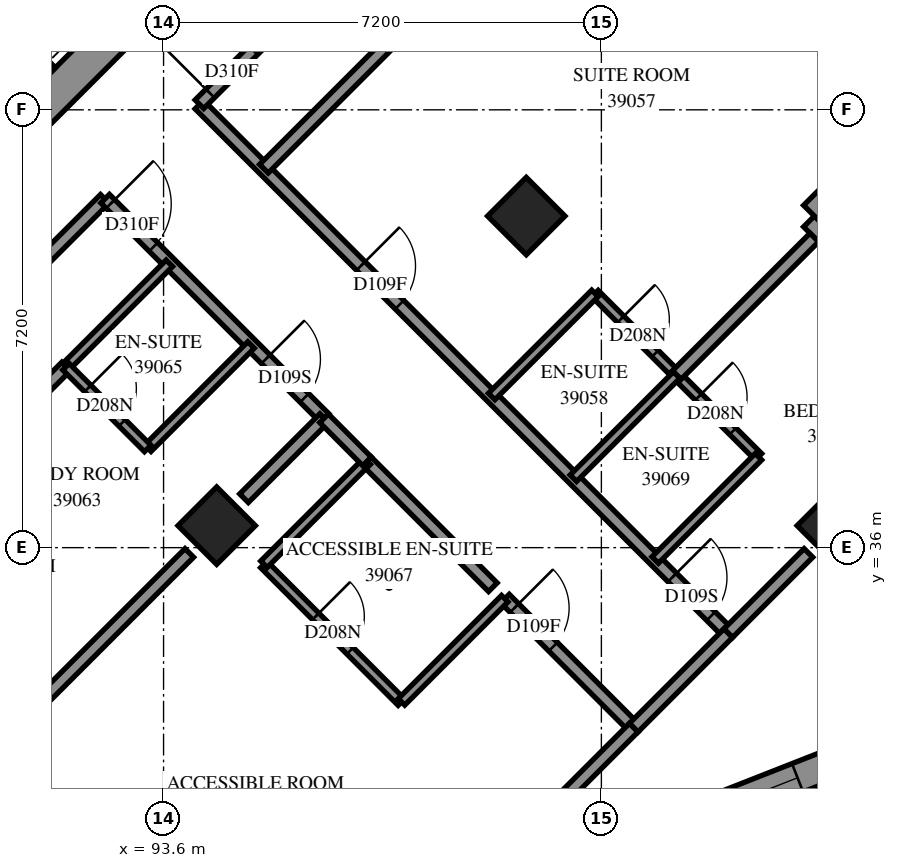
"""IFC4 building model, lengths in metres.
Left out: names, types, materials, properties, quantities, classifications, styles, units other than length and angle.
Written with IfcOpenShell. Run it as: python <this file> out.ifc"""

import sys

from ifc_helpers import new_model, si_unit, direction, frame, frame_2d, origin, origin_2d, place, context, subcontext, project, spatial, polyline, rectangle, outline, extrude, element, fill, save


model = new_model("IFC4")
c1 = context("Model", 3, precision=1e-05, world=origin(), true_north=direction((0.0, 1.0)))
c2 = subcontext(c1, "Body", "Model", "MODEL_VIEW")
j1 = project(units=[si_unit("LENGTHUNIT", "METRE"), si_unit("PLANEANGLEUNIT", "RADIAN")], contexts=[c1])
p1 = place(None, origin())
s1 = spatial("IfcSite", under=j1, at=p1, CompositionType="ELEMENT")
p2 = place(p1, origin())
s2 = spatial("IfcBuilding", under=s1, at=p2, CompositionType="ELEMENT")
p3 = place(p2, frame((0.0, 0.0, 145.6)))
s3 = spatial("IfcBuildingStorey", under=s2, at=p3, CompositionType="ELEMENT", Elevation=145.6)
for number, where, z_axis, x_axis in (
    (1, (99.565, 41.453, 0.0), (0.0, 0.0, 1.0), (0.707, -0.707, 0.0)),
    (2, (94.474, 36.362, 0.0), (0.0, 0.0, 1.0), (0.707, -0.707, 0.0)),
    (3, (104.656, 36.362, 0.0), (0.0, 0.0, 1.0), (0.707, -0.707, 0.0)),
):
    element("IfcColumn", number, at=place(p3, frame(where, z_axis=z_axis, x_axis=x_axis)), inside=s3, PredefinedType="COLUMN", context=c2, shape_type="SweptSolid", body=[
        extrude(rectangle(XDim=0.9, YDim=0.9, at=origin_2d()), origin(), (0.0, 0.0, 1.0), 3.1),
    ])
p4 = place(p3, frame((87.049, 38.695, -0.3), z_axis=(0.0, 0.0, 1.0), x_axis=(0.7071067812, 0.7071067812, 0.0)))
e4 = element("IfcWall", 4, at=p4, inside=s3, PredefinedType="SHEAR", context=c2, shape_type="SweptSolid", body=[
    extrude(rectangle(XDim=14.4, YDim=0.6, at=frame_2d((7.2, 0.0))), origin(), (0.0, 0.0, 1.0), 2.7),
])
p5 = place(p4, frame((4.55, 0.0, 0.3)))
e5 = element("IfcOpeningElement", 5, at=p5, cuts=e4, PredefinedType="OPENING", context=c2, shape_type="SweptSolid", body=[
    extrude(rectangle(XDim=1.1, YDim=2.1, at=frame_2d((0.55, 1.05))), frame((0.0, 0.31, 0.0), z_axis=(0.0, -1.0, 0.0), x_axis=(1.0, 0.0, 0.0)), (0.0, 0.0, 1.0), 0.62),
])
p6 = place(p4, frame((11.35, 0.0, 0.3)))
e6 = element("IfcOpeningElement", 6, at=p6, cuts=e4, PredefinedType="OPENING", context=c2, shape_type="SweptSolid", body=[
    extrude(rectangle(XDim=1.1, YDim=2.1, at=frame_2d((0.55, 1.05))), frame((0.0, 0.31, 0.0), z_axis=(0.0, -1.0, 0.0), x_axis=(1.0, 0.0, 0.0)), (0.0, 0.0, 1.0), 0.62),
])
p7 = place(p3, frame((81.534, 53.969, 0.0), z_axis=(0.0, 0.0, 1.0), x_axis=(0.707103309, -0.7071102534, 0.0)))
e7 = element("IfcWall", 7, at=p7, inside=s3, PredefinedType="SOLIDWALL", context=c2, shape_type="SweptSolid", body=[
    extrude(rectangle(XDim=14.4, YDim=0.3, at=frame_2d((7.2, 0.0))), origin(), (0.0, 0.0, 1.0), 3.1),
])
p8 = place(p7, frame((1.25, 0.0, 0.0)))
e8 = element("IfcOpeningElement", 8, at=p8, cuts=e7, PredefinedType="OPENING", context=c2, shape_type="SweptSolid", body=[
    extrude(rectangle(XDim=1.1, YDim=2.1, at=frame_2d((0.55, 1.05))), frame((0.0, 0.16, 0.0), z_axis=(0.0, -1.0, 0.0), x_axis=(1.0, 0.0, 0.0)), (0.0, 0.0, 1.0), 0.32),
])
p9 = place(p7, frame((4.85, 0.0, 0.0)))
e9 = element("IfcOpeningElement", 9, at=p9, cuts=e7, PredefinedType="OPENING", context=c2, shape_type="SweptSolid", body=[
    extrude(rectangle(XDim=1.1, YDim=2.1, at=frame_2d((0.55, 1.05))), frame((0.0, 0.16, 0.0), z_axis=(0.0, -1.0, 0.0), x_axis=(1.0, 0.0, 0.0)), (0.0, 0.0, 1.0), 0.32),
])
p10 = place(p7, frame((8.45, 0.0, 0.0)))
e10 = element("IfcOpeningElement", 10, at=p10, cuts=e7, PredefinedType="OPENING", context=c2, shape_type="SweptSolid", body=[
    extrude(rectangle(XDim=1.1, YDim=2.1, at=frame_2d((0.55, 1.05))), frame((0.0, 0.16, 0.0), z_axis=(0.0, -1.0, 0.0), x_axis=(1.0, 0.0, 0.0)), (0.0, 0.0, 1.0), 0.32),
])
p11 = place(p7, frame((12.05, 0.0, 0.0)))
e11 = element("IfcOpeningElement", 11, at=p11, cuts=e7, PredefinedType="OPENING", context=c2, shape_type="SweptSolid", body=[
    extrude(rectangle(XDim=1.1, YDim=2.1, at=frame_2d((0.55, 1.05))), frame((0.0, 0.16, 0.0), z_axis=(0.0, -1.0, 0.0), x_axis=(1.0, 0.0, 0.0)), (0.0, 0.0, 1.0), 0.32),
])
p12 = place(p3, frame((100.86, 30.972, 0.0), z_axis=(0.0, 0.0, 1.0), x_axis=(0.9307296188, 0.3657080484, 0.0)))
e12 = element("IfcWall", 12, at=p12, inside=s3, PredefinedType="SOLIDWALL", context=c2, shape_type="SweptSolid", body=[
    extrude(outline(polyline([(0.109, -0.25), (5.615, -0.25), (5.388, 0.25), (-0.109, 0.25), (0.109, -0.25)])), origin(), (0.0, 0.0, 1.0), 3.1),
])
p13 = place(p12, frame((0.602, 0.0, 0.45)))
e13 = element("IfcOpeningElement", 13, at=p13, cuts=e12, PredefinedType="OPENING", context=c2, shape_type="SweptSolid", body=[
    extrude(rectangle(XDim=2.8, YDim=2.5, at=frame_2d((1.4, 1.25))), frame((0.0, 0.26, 0.0), z_axis=(0.0, -1.0, 0.0), x_axis=(1.0, 0.0, 0.0)), (0.0, 0.0, 1.0), 0.52),
])
p14 = place(p3, frame((107.761, 37.994, 0.0), z_axis=(0.0, 0.0, 1.0), x_axis=(-0.7071170016, 0.7070965606, 0.0)))
e14 = element("IfcWall", 14, at=p14, inside=s3, PredefinedType="SOLIDWALL", context=c2, shape_type="SweptSolid", body=[
    extrude(outline(polyline([(-0.158, -0.25), (4.642, -0.25), (5.142, 0.25), (0.158, 0.25), (-0.158, -0.25)])), origin(), (0.0, 0.0, 1.0), 3.1),
])
p15 = place(p14, frame((1.967, 0.0, 0.6)))
e15 = element("IfcOpeningElement", 15, at=p15, cuts=e14, PredefinedType="OPENING", context=c2, shape_type="SweptSolid", body=[
    extrude(rectangle(XDim=1.8, YDim=1.9, at=frame_2d((0.9, 0.95))), frame((0.0, 0.26, 0.0), z_axis=(0.0, -1.0, 0.0), x_axis=(1.0, 0.0, 0.0)), (0.0, 0.0, 1.0), 0.52),
])
p16 = place(p3, frame((104.302, 41.453, 0.0), z_axis=(0.0, 0.0, 1.0), x_axis=(0.7071155421, 0.7070980202, 0.0)))
e16 = element("IfcWall", 16, at=p16, inside=s3, PredefinedType="SOLIDWALL", context=c2, shape_type="SweptSolid", body=[
    extrude(outline(polyline([(0.25, -0.25), (6.041, -0.25), (5.373, 0.25), (-0.25, 0.25), (0.25, -0.25)])), origin(), (0.0, 0.0, 1.0), 3.1),
])
p17 = place(p16, frame((1.125, 0.0, 0.6)))
e17 = element("IfcOpeningElement", 17, at=p17, cuts=e16, PredefinedType="OPENING", context=c2, shape_type="SweptSolid", body=[
    extrude(rectangle(XDim=1.8, YDim=1.9, at=frame_2d((0.9, 0.95))), frame((0.0, 0.26, 0.0), z_axis=(0.0, -1.0, 0.0), x_axis=(1.0, 0.0, 0.0)), (0.0, 0.0, 1.0), 0.52),
])
p18 = place(p3, frame((94.189, 43.287, 0.0), z_axis=(0.0, 0.0, 1.0), x_axis=(0.7071067812, -0.7071067812, 0.0)))
e18 = element("IfcWall", 18, at=p18, inside=s3, PredefinedType="PARTITIONING", context=c2, shape_type="SweptSolid", body=[
    extrude(rectangle(XDim=12.298, YDim=0.2, at=frame_2d((6.149, 0.0))), origin(), (0.0, 0.0, 1.0), 3.1),
])
p19 = place(p18, frame((3.755, 0.0, 0.0)))
e19 = element("IfcOpeningElement", 19, at=p19, cuts=e18, PredefinedType="OPENING", context=c2, shape_type="SweptSolid", body=[
    extrude(rectangle(XDim=0.9, YDim=2.1, at=frame_2d((0.45, 1.05))), frame((0.0, 0.11, 0.0), z_axis=(0.0, -1.0, 0.0), x_axis=(1.0, 0.0, 0.0)), (0.0, 0.0, 1.0), 0.22),
])
p20 = place(p18, frame((10.998, 0.0, 0.0)))
e20 = element("IfcOpeningElement", 20, at=p20, cuts=e18, PredefinedType="OPENING", context=c2, shape_type="SweptSolid", body=[
    extrude(rectangle(XDim=0.9, YDim=2.1, at=frame_2d((0.45, 1.05))), frame((0.0, 0.11, 0.0), z_axis=(0.0, -1.0, 0.0), x_axis=(1.0, 0.0, 0.0)), (0.0, 0.0, 1.0), 0.22),
])
p21 = place(p3, frame((95.25, 42.232, 0.0), z_axis=(0.0, 0.0, 1.0), x_axis=(0.7071114386, 0.7071021238, 0.0)))
e21 = element("IfcWall", 21, at=p21, inside=s3, PredefinedType="PARTITIONING", context=c2, shape_type="SweptSolid", body=[
    extrude(rectangle(XDim=10.736, YDim=0.2, at=frame_2d((5.368, 0.0))), origin(), (0.0, 0.0, 1.0), 3.1),
])
p22 = place(p3, frame((94.19, 43.292, 0.0), z_axis=(0.0, 0.0, 1.0), x_axis=(0.7071067812, 0.7071067812, 0.0)))
e22 = element("IfcWall", 22, at=p22, inside=s3, PredefinedType="PARTITIONING", context=c2, shape_type="SweptSolid", body=[
    extrude(rectangle(XDim=8.2, YDim=0.2, at=frame_2d((4.1, 0.0))), origin(), (0.0, 0.0, 1.0), 3.1),
])
p23 = place(p22, frame((0.251, 0.0, 0.0)))
e23 = element("IfcOpeningElement", 23, at=p23, cuts=e22, PredefinedType="OPENING", context=c2, shape_type="SweptSolid", body=[
    extrude(rectangle(XDim=1.0, YDim=2.1, at=frame_2d((0.5, 1.05))), frame((0.0, 0.11, 0.0), z_axis=(0.0, -1.0, 0.0), x_axis=(1.0, 0.0, 0.0)), (0.0, 0.0, 1.0), 0.22),
])
p24 = place(p3, frame((86.836, 35.938, 0.0), z_axis=(0.0, 0.0, 1.0), x_axis=(0.7071067812, 0.7071067812, 0.0)))
e24 = element("IfcWall", 24, at=p24, inside=s3, PredefinedType="PARTITIONING", context=c2, shape_type="SweptSolid", body=[
    extrude(rectangle(XDim=8.2, YDim=0.2, at=frame_2d((4.1, 0.0))), origin(), (0.0, 0.0, 1.0), 3.1),
])
p25 = place(p3, frame((86.33, 33.311, 0.0), z_axis=(0.0, 0.0, 1.0), x_axis=(0.7071005425, 0.7071130198, 0.0)))
e25 = element("IfcWall", 25, at=p25, inside=s3, PredefinedType="PARTITIONING", context=c2, shape_type="SweptSolid", body=[
    extrude(rectangle(XDim=8.015, YDim=0.2, at=frame_2d((4.007, 0.0))), origin(), (0.0, 0.0, 1.0), 3.1),
])
p26 = place(p3, frame((89.831, 31.721, 0.0), z_axis=(0.0, 0.0, 1.0), x_axis=(0.7071067812, 0.7071067812, 0.0)))
e26 = element("IfcWall", 26, at=p26, inside=s3, PredefinedType="PARTITIONING", context=c2, shape_type="SweptSolid", body=[
    extrude(rectangle(XDim=5.928, YDim=0.2, at=frame_2d((2.964, 0.0))), origin(), (0.0, 0.0, 1.0), 3.1),
])
p27 = place(p3, frame((92.639, 41.739, 0.0), z_axis=(0.0, 0.0, 1.0), x_axis=(0.7071067812, -0.7071067812, 0.0)))
e27 = element("IfcWall", 27, at=p27, inside=s3, PredefinedType="PARTITIONING", context=c2, shape_type="SweptSolid", body=[
    extrude(rectangle(XDim=5.1, YDim=0.2, at=frame_2d((2.55, 0.0))), origin(), (0.0, 0.0, 1.0), 3.1),
])
p28 = place(p27, frame((0.123, 0.0, 0.0)))
e28 = element("IfcOpeningElement", 28, at=p28, cuts=e27, PredefinedType="OPENING", context=c2, shape_type="SweptSolid", body=[
    extrude(rectangle(XDim=1.0, YDim=2.1, at=frame_2d((0.5, 1.05))), frame((0.0, 0.11, 0.0), z_axis=(0.0, -1.0, 0.0), x_axis=(1.0, 0.0, 0.0)), (0.0, 0.0, 1.0), 0.22),
])
p29 = place(p27, frame((3.734, 0.0, 0.0)))
e29 = element("IfcOpeningElement", 29, at=p29, cuts=e27, PredefinedType="OPENING", context=c2, shape_type="SweptSolid", body=[
    extrude(rectangle(XDim=0.9, YDim=2.1, at=frame_2d((0.45, 1.05))), frame((0.0, 0.11, 0.0), z_axis=(0.0, -1.0, 0.0), x_axis=(1.0, 0.0, 0.0)), (0.0, 0.0, 1.0), 0.22),
])
p30 = place(p3, frame((100.694, 40.178, 0.0), z_axis=(0.0, 0.0, 1.0), x_axis=(0.7076329021, -0.7065802685, 0.0)))
e30 = element("IfcWall", 30, at=p30, inside=s3, PredefinedType="PARTITIONING", context=c2, shape_type="SweptSolid", body=[
    extrude(rectangle(XDim=3.8, YDim=0.15, at=frame_2d((1.9, 0.0))), origin(), (0.0, 0.0, 1.0), 3.1),
])
p31 = place(p30, frame((0.598, 0.0, 0.0)))
e31 = element("IfcOpeningElement", 31, at=p31, cuts=e30, PredefinedType="OPENING", context=c2, shape_type="SweptSolid", body=[
    extrude(rectangle(XDim=0.8, YDim=2.1, at=frame_2d((0.4, 1.05))), frame((0.0, 0.085, 0.0), z_axis=(0.0, -1.0, 0.0), x_axis=(1.0, 0.0, 0.0)), (0.0, 0.0, 1.0), 0.17),
])
p32 = place(p30, frame((2.405, 0.0, 0.0)))
e32 = element("IfcOpeningElement", 32, at=p32, cuts=e30, PredefinedType="OPENING", context=c2, shape_type="SweptSolid", body=[
    extrude(rectangle(XDim=0.8, YDim=2.1, at=frame_2d((0.4, 1.05))), frame((0.0, 0.085, 0.0), z_axis=(0.0, -1.0, 0.0), x_axis=(1.0, 0.0, 0.0)), (0.0, 0.0, 1.0), 0.17),
])
p33 = place(p3, frame((95.249, 35.723, 0.0), z_axis=(0.0, 0.0, 1.0), x_axis=(0.7067942478, -0.7074191764, 0.0)))
e33 = element("IfcWall", 33, at=p33, inside=s3, PredefinedType="PARTITIONING", context=c2, shape_type="SweptSolid", body=[
    extrude(rectangle(XDim=3.2, YDim=0.15, at=frame_2d((1.6, 0.0))), origin(), (0.0, 0.0, 1.0), 3.1),
])
p34 = place(p33, frame((1.206, 0.0, 0.0)))
e34 = element("IfcOpeningElement", 34, at=p34, cuts=e33, PredefinedType="OPENING", context=c2, shape_type="SweptSolid", body=[
    extrude(rectangle(XDim=0.8, YDim=2.1, at=frame_2d((0.4, 1.05))), frame((0.0, 0.085, 0.0), z_axis=(0.0, -1.0, 0.0), x_axis=(1.0, 0.0, 0.0)), (0.0, 0.0, 1.0), 0.17),
])
p35 = place(p3, frame((102.04, 38.838, 0.0), z_axis=(0.0, 0.0, 1.0), x_axis=(0.7071067812, 0.7071067812, 0.0)))
e35 = element("IfcWall", 35, at=p35, inside=s3, PredefinedType="PARTITIONING", context=c2, shape_type="SweptSolid", body=[
    extrude(rectangle(XDim=3.199, YDim=0.2, at=frame_2d((1.599, 0.0))), origin(), (0.0, 0.0, 1.0), 3.1),
])
p36 = place(p3, frame((99.214, 35.162, 0.0), z_axis=(0.0, 0.0, 1.0), x_axis=(0.706773319, -0.7074400862, 0.0)))
e36 = element("IfcWall", 36, at=p36, inside=s3, PredefinedType="PARTITIONING", context=c2, shape_type="SweptSolid", body=[
    extrude(rectangle(XDim=2.999, YDim=0.2, at=frame_2d((1.5, 0.0))), origin(), (0.0, 0.0, 1.0), 3.1),
])
p37 = place(p36, frame((0.22, 0.0, 0.0)))
e37 = element("IfcOpeningElement", 37, at=p37, cuts=e36, PredefinedType="OPENING", context=c2, shape_type="SweptSolid", body=[
    extrude(rectangle(XDim=0.9, YDim=2.1, at=frame_2d((0.45, 1.05))), frame((0.0, 0.11, 0.0), z_axis=(0.0, -1.0, 0.0), x_axis=(1.0, 0.0, 0.0)), (0.0, 0.0, 1.0), 0.22),
])
p38 = place(p3, frame((96.945, 37.419, 0.0), z_axis=(0.0, 0.0, 1.0), x_axis=(0.7071067812, -0.7071067812, 0.0)))
e38 = element("IfcWall", 38, at=p38, inside=s3, PredefinedType="PARTITIONING", context=c2, shape_type="SweptSolid", body=[
    extrude(rectangle(XDim=2.927, YDim=0.2, at=frame_2d((1.464, 0.0))), origin(), (0.0, 0.0, 1.0), 3.1),
])
for number, where, z_axis, x_axis in (
    (39, (97.513, 33.463, 0.0), (0.0, 0.0, 1.0), (0.707, 0.707, 0.0)),
    (40, (93.341, 37.635, 0.0), (0.0, 0.0, 1.0), (0.707, 0.707, 0.0)),
    (41, (101.685, 35.797, 0.0), (0.0, 0.0, 1.0), (0.707, 0.707, 0.0)),
    (42, (91.997, 38.979, 0.0), (0.0, 0.0, 1.0), (0.707, 0.707, 0.0)),
):
    element("IfcWall", number, at=place(p3, frame(where, z_axis=z_axis, x_axis=x_axis)), inside=s3, PredefinedType="PARTITIONING", context=c2, shape_type="SweptSolid", body=[
        extrude(rectangle(XDim=2.401, YDim=0.15, at=frame_2d((1.201, 0.0))), origin(), (0.0, 0.0, 1.0), 3.1),
    ])
for number, where, z_axis, x_axis in (
    (43, (100.34, 37.142, 0.0), (0.0, 0.0, 1.0), (0.708, 0.707, 0.0)),
    (44, (98.996, 38.486, 0.0), (0.0, 0.0, 1.0), (0.708, 0.707, 0.0)),
):
    element("IfcWall", number, at=place(p3, frame(where, z_axis=z_axis, x_axis=x_axis)), inside=s3, PredefinedType="PARTITIONING", context=c2, shape_type="SweptSolid", body=[
        extrude(rectangle(XDim=2.4, YDim=0.15, at=frame_2d((1.2, 0.0))), origin(), (0.0, 0.0, 1.0), 3.1),
    ])
p39 = place(p3, frame((95.251, 35.727, 0.0), z_axis=(0.0, 0.0, 1.0), x_axis=(0.7071067812, 0.7071067812, 0.0)))
e45 = element("IfcWall", 45, at=p39, inside=s3, PredefinedType="PARTITIONING", context=c2, shape_type="SweptSolid", body=[
    extrude(rectangle(XDim=2.398, YDim=0.15, at=frame_2d((1.199, 0.0))), origin(), (0.0, 0.0, 1.0), 3.1),
])
p40 = place(p3, frame((101.331, 33.039, 0.0), z_axis=(0.0, 0.0, 1.0), x_axis=(0.7071067812, 0.7071067812, 0.0)))
e46 = element("IfcWall", 46, at=p40, inside=s3, PredefinedType="PARTITIONING", context=c2, shape_type="SweptSolid", body=[
    extrude(rectangle(XDim=2.2, YDim=0.2, at=frame_2d((1.1, 0.0))), origin(), (0.0, 0.0, 1.0), 2.6),
])
p41 = place(p3, frame((91.995, 38.975, 0.0), z_axis=(0.0, 0.0, 1.0), x_axis=(0.7071067812, -0.7071067812, 0.0)))
e47 = element("IfcWall", 47, at=p41, inside=s3, PredefinedType="PARTITIONING", context=c2, shape_type="SweptSolid", body=[
    extrude(rectangle(XDim=1.901, YDim=0.15, at=frame_2d((0.95, 0.0))), origin(), (0.0, 0.0, 1.0), 3.1),
])
p42 = place(p41, frame((0.506, 0.0, 0.0)))
e48 = element("IfcOpeningElement", 48, at=p42, cuts=e47, PredefinedType="OPENING", context=c2, shape_type="SweptSolid", body=[
    extrude(rectangle(XDim=0.8, YDim=2.1, at=frame_2d((0.4, 1.05))), frame((0.0, 0.085, 0.0), z_axis=(0.0, -1.0, 0.0), x_axis=(1.0, 0.0, 0.0)), (0.0, 0.0, 1.0), 0.17),
])
p43 = place(p3, frame((102.887, 34.595, 0.0), z_axis=(0.0, 0.0, 1.0), x_axis=(0.7071067812, 0.7071067812, 0.0)))
e49 = element("IfcWall", 49, at=p43, inside=s3, PredefinedType="PARTITIONING", context=c2, shape_type="SweptSolid", body=[
    extrude(rectangle(XDim=1.864, YDim=0.2, at=frame_2d((0.932, 0.0))), origin(), (0.0, 0.0, 1.0), 2.6),
])
p44 = place(p3, frame((94.923, 36.813, 0.0), z_axis=(0.0, 0.0, 1.0), x_axis=(0.7071067812, 0.7071067812, 0.0)))
e50 = element("IfcWall", 50, at=p44, inside=s3, PredefinedType="PARTITIONING", context=c2, shape_type="SweptSolid", body=[
    extrude(rectangle(XDim=1.864, YDim=0.2, at=frame_2d((0.932, 0.0))), origin(), (0.0, 0.0, 1.0), 3.1),
])
p45 = place(p3, frame((100.013, 31.721, 0.0), z_axis=(0.0, 0.0, 1.0), x_axis=(0.7071067812, 0.7071067812, 0.0)))
e51 = element("IfcWall", 51, at=p45, inside=s3, PredefinedType="PARTITIONING", context=c2, shape_type="SweptSolid", body=[
    extrude(rectangle(XDim=1.864, YDim=0.2, at=frame_2d((0.932, 0.0))), origin(), (0.0, 0.0, 1.0), 2.6),
])
p46 = place(p3, frame((96.24, 38.128, 0.0), z_axis=(0.0, 0.0, 1.0), x_axis=(0.7061059238, -0.7081062239, 0.0)))
e52 = element("IfcWall", 52, at=p46, inside=s3, PredefinedType="PARTITIONING", context=c2, shape_type="SweptSolid", body=[
    extrude(rectangle(XDim=1.0, YDim=0.2, at=frame_2d((0.5, 0.0))), origin(), (0.0, 0.0, 1.0), 3.1),
])
p47 = place(p13, origin())
e53 = element("IfcWindow", 53, at=p47, inside=s3, PartitioningType="SINGLE_PANEL", PredefinedType="WINDOW", context=c2, shape_type="SweptSolid", body=[
    extrude(rectangle(XDim=2.8, YDim=2.5, at=frame_2d((1.4, 1.25))), frame((0.0, 0.18, 0.0), z_axis=(0.0, -1.0, 0.0), x_axis=(1.0, 0.0, 0.0)), (0.0, 0.0, 1.0), 0.06),
])
fill(e13, e53)
p48 = place(p23, origin())
e54 = element("IfcDoor", 54, at=p48, inside=s3, OperationType="SINGLE_SWING_RIGHT", PredefinedType="DOOR", context=c2, shape_type="SweptSolid", body=[
    extrude(rectangle(XDim=1.0, YDim=2.1, at=frame_2d((0.5, 1.05))), frame((0.0, 0.025, 0.0), z_axis=(0.0, -1.0, 0.0), x_axis=(1.0, 0.0, 0.0)), (0.0, 0.0, 1.0), 0.05),
])
fill(e23, e54)
p49 = place(p19, origin())
e55 = element("IfcDoor", 55, at=p49, inside=s3, OperationType="SINGLE_SWING_RIGHT", PredefinedType="DOOR", context=c2, shape_type="SweptSolid", body=[
    extrude(rectangle(XDim=0.9, YDim=2.1, at=frame_2d((0.45, 1.05))), frame((0.0, 0.025, 0.0), z_axis=(0.0, -1.0, 0.0), x_axis=(1.0, 0.0, 0.0)), (0.0, 0.0, 1.0), 0.05),
])
fill(e19, e55)
p50 = place(p31, origin())
e56 = element("IfcDoor", 56, at=p50, inside=s3, OperationType="SINGLE_SWING_RIGHT", PredefinedType="DOOR", context=c2, shape_type="SweptSolid", body=[
    extrude(rectangle(XDim=0.8, YDim=2.1, at=frame_2d((0.4, 1.05))), frame((0.0, 0.025, 0.0), z_axis=(0.0, -1.0, 0.0), x_axis=(1.0, 0.0, 0.0)), (0.0, 0.0, 1.0), 0.05),
])
fill(e31, e56)
p51 = place(p28, origin())
e57 = element("IfcDoor", 57, at=p51, inside=s3, OperationType="SINGLE_SWING_RIGHT", PredefinedType="DOOR", context=c2, shape_type="SweptSolid", body=[
    extrude(rectangle(XDim=1.0, YDim=2.1, at=frame_2d((0.5, 1.05))), frame((0.0, 0.025, 0.0), z_axis=(0.0, -1.0, 0.0), x_axis=(1.0, 0.0, 0.0)), (0.0, 0.0, 1.0), 0.05),
])
fill(e28, e57)
p52 = place(p29, origin())
e58 = element("IfcDoor", 58, at=p52, inside=s3, OperationType="SINGLE_SWING_LEFT", PredefinedType="DOOR", context=c2, shape_type="SweptSolid", body=[
    extrude(rectangle(XDim=0.9, YDim=2.1, at=frame_2d((0.45, 1.05))), frame((0.0, 0.025, 0.0), z_axis=(0.0, -1.0, 0.0), x_axis=(1.0, 0.0, 0.0)), (0.0, 0.0, 1.0), 0.05),
])
fill(e29, e58)
p53 = place(p42, origin())
e59 = element("IfcDoor", 59, at=p53, inside=s3, OperationType="SINGLE_SWING_RIGHT", PredefinedType="DOOR", context=c2, shape_type="SweptSolid", body=[
    extrude(rectangle(XDim=0.8, YDim=2.1, at=frame_2d((0.4, 1.05))), frame((0.0, 0.025, 0.0), z_axis=(0.0, -1.0, 0.0), x_axis=(1.0, 0.0, 0.0)), (0.0, 0.0, 1.0), 0.05),
])
fill(e48, e59)
p54 = place(p37, origin())
e60 = element("IfcDoor", 60, at=p54, inside=s3, OperationType="SINGLE_SWING_RIGHT", PredefinedType="DOOR", context=c2, shape_type="SweptSolid", body=[
    extrude(rectangle(XDim=0.9, YDim=2.1, at=frame_2d((0.45, 1.05))), frame((0.0, 0.025, 0.0), z_axis=(0.0, -1.0, 0.0), x_axis=(1.0, 0.0, 0.0)), (0.0, 0.0, 1.0), 0.05),
])
fill(e37, e60)
p55 = place(p34, origin())
e61 = element("IfcDoor", 61, at=p55, inside=s3, OperationType="SINGLE_SWING_RIGHT", PredefinedType="DOOR", context=c2, shape_type="SweptSolid", body=[
    extrude(rectangle(XDim=0.8, YDim=2.1, at=frame_2d((0.4, 1.05))), frame((0.0, 0.025, 0.0), z_axis=(0.0, -1.0, 0.0), x_axis=(1.0, 0.0, 0.0)), (0.0, 0.0, 1.0), 0.05),
])
fill(e34, e61)
p56 = place(p20, origin())
e62 = element("IfcDoor", 62, at=p56, inside=s3, OperationType="SINGLE_SWING_RIGHT", PredefinedType="DOOR", context=c2, shape_type="SweptSolid", body=[
    extrude(rectangle(XDim=0.9, YDim=2.1, at=frame_2d((0.45, 1.05))), frame((0.0, 0.025, 0.0), z_axis=(0.0, -1.0, 0.0), x_axis=(1.0, 0.0, 0.0)), (0.0, 0.0, 1.0), 0.05),
])
fill(e20, e62)
p57 = place(p32, origin())
e63 = element("IfcDoor", 63, at=p57, inside=s3, OperationType="SINGLE_SWING_RIGHT", PredefinedType="DOOR", context=c2, shape_type="SweptSolid", body=[
    extrude(rectangle(XDim=0.8, YDim=2.1, at=frame_2d((0.4, 1.05))), frame((0.0, 0.025, 0.0), z_axis=(0.0, -1.0, 0.0), x_axis=(1.0, 0.0, 0.0)), (0.0, 0.0, 1.0), 0.05),
])
fill(e32, e63)
save(model, sys.argv[1])
